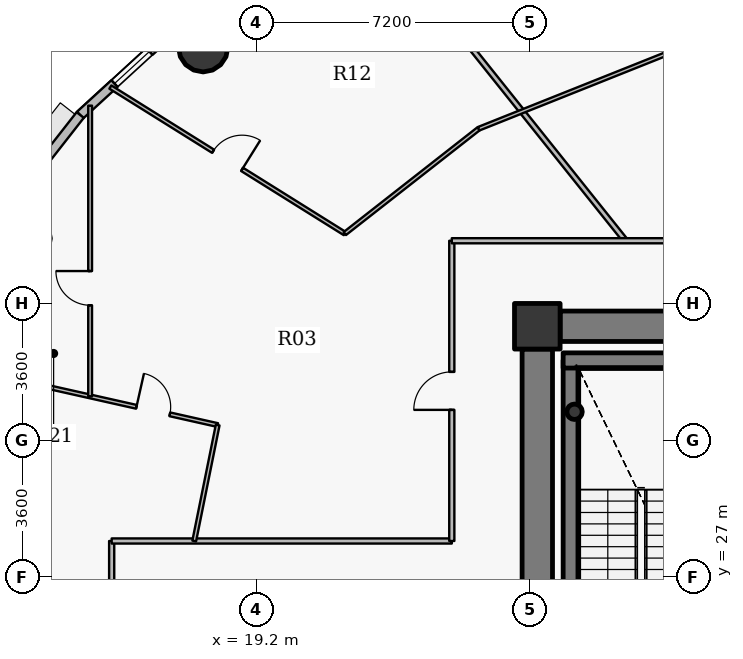
"""IFC4 building model, lengths in metres.
Left out: names, types, materials, properties, quantities, classifications, styles, units other than length and angle.
Written with IfcOpenShell. Run it as: python <this file> out.ifc"""

import sys

from ifc_helpers import new_model, si_unit, direction, frame, frame_2d, origin, origin_2d, place, context, subcontext, project, spatial, rectangle, hollow_circle, extrude, source, transform, mapped, element, fill, save


model = new_model("IFC4")
c1 = context("Model", 3, precision=1e-05, world=origin(), true_north=direction((0.0, 1.0)))
c2 = subcontext(c1, "Body", "Model", "MODEL_VIEW")
j1 = project(units=[si_unit("LENGTHUNIT", "METRE"), si_unit("PLANEANGLEUNIT", "RADIAN")], contexts=[c1])
p1 = place(None, origin())
s1 = spatial("IfcSite", under=j1, at=p1, CompositionType="ELEMENT")
p2 = place(p1, origin())
s2 = spatial("IfcBuilding", under=s1, at=p2, CompositionType="ELEMENT")
p3 = place(p2, frame((0.0, 0.0, 182.4)))
s3 = spatial("IfcBuildingStorey", under=s2, at=p3, CompositionType="ELEMENT", Elevation=182.4)
p4 = place(p3, frame((26.6, 33.6, 0.0), z_axis=(0.0, 0.0, 1.0), x_axis=(1.0, 0.0, 0.0)))
e1 = element("IfcColumn", 1, at=p4, inside=s3, PredefinedType="COLUMN", context=c2, shape_type="SweptSolid", body=[
    extrude(rectangle(XDim=1.2, YDim=1.2, at=origin_2d()), origin(), (0.0, 0.0, 1.0), 3.75),
])
p5 = place(p3, frame((27.48, 24.1, 0.0), z_axis=(0.0, 0.0, 1.0), x_axis=(0.0, 1.0, 0.0)))
e2 = element("IfcWall", 2, at=p5, inside=s3, PredefinedType="SHEAR", context=c2, shape_type="SweptSolid", body=[
    extrude(rectangle(XDim=8.6, YDim=0.4, at=frame_2d((4.3, 0.0))), origin(), (0.0, 0.0, 1.0), 3.75),
])
p6 = place(p3, frame((27.28, 32.7, 0.0), z_axis=(0.0, 0.0, 1.0), x_axis=(1.0, 0.0, 0.0)))
e3 = element("IfcWall", 3, at=p6, inside=s3, PredefinedType="SHEAR", context=c2, shape_type="SweptSolid", body=[
    extrude(rectangle(XDim=4.1, YDim=0.4, at=frame_2d((2.05, 0.0))), origin(), (0.0, 0.0, 1.0), 3.75),
])
p7 = place(p3, frame((27.58, 31.35, 0.0), z_axis=(0.0, 0.0, 1.0), x_axis=(1.0, 0.0, 0.0)))
e4 = element("IfcColumn", 4, at=p7, inside=s3, PredefinedType="COLUMN", context=c2, shape_type="SweptSolid", body=[
    extrude(hollow_circle(Radius=0.203, WallThickness=0.016, at=origin_2d()), origin(), (0.0, 0.0, 1.0), 3.75),
])
p8 = place(p3, frame((27.2, 33.6, 0.0), z_axis=(0.0, 0.0, 1.0), x_axis=(1.0, 0.0, 0.0)))
e5 = element("IfcWall", 5, at=p8, inside=s3, PredefinedType="SHEAR", context=c2, shape_type="SweptSolid", body=[
    extrude(rectangle(XDim=17.6, YDim=0.8, at=frame_2d((8.8, 0.0))), origin(), (0.0, 0.0, 1.0), 2.95),
])
p9 = place(p8, frame((13.45, 0.0, 0.0)))
e6 = element("IfcOpeningElement", 6, at=p9, cuts=e5, PredefinedType="OPENING", context=c2, shape_type="SweptSolid", body=[
    extrude(rectangle(XDim=1.15, YDim=2.15, at=origin_2d()), frame((0.575, 0.41, 1.075), z_axis=(0.0, -1.0, 0.0), x_axis=(1.0, 0.0, 0.0)), (0.0, 0.0, 1.0), 0.82),
])
p10 = place(p3, frame((26.6, 21.0, 0.0), z_axis=(0.0, 0.0, 1.0), x_axis=(0.0, 1.0, 0.0)))
e7 = element("IfcWall", 7, at=p10, inside=s3, PredefinedType="SHEAR", context=c2, shape_type="SweptSolid", body=[
    extrude(rectangle(XDim=12.0, YDim=0.8, at=frame_2d((6.0, 0.0))), origin(), (0.0, 0.0, 1.0), 2.95),
])
p11 = place(p10, frame((1.061, 0.0, 0.0)))
e8 = element("IfcOpeningElement", 8, at=p11, cuts=e7, PredefinedType="OPENING", context=c2, shape_type="SweptSolid", body=[
    extrude(rectangle(XDim=1.15, YDim=2.15, at=origin_2d()), frame((0.575, 0.41, 1.075), z_axis=(0.0, -1.0, 0.0), x_axis=(1.0, 0.0, 0.0)), (0.0, 0.0, 1.0), 0.82),
])
p12 = place(p3, frame((17.808, 40.942, 0.0), z_axis=(0.0, 0.0, 1.0), x_axis=(1.0, 0.0, 0.0)))
e9 = element("IfcColumn", 9, at=p12, inside=s3, PredefinedType="COLUMN", context=c2, shape_type="SweptSolid", body=[
    extrude(hollow_circle(Radius=0.65, WallThickness=0.04, at=origin_2d()), origin(), (0.0, 0.0, 1.0), 3.75),
])
p13 = place(p3, frame((14.572, 39.158, 0.0), z_axis=(0.0, 0.0, 1.0), x_axis=(0.737076565834, 0.675809245349, 0.0)))
e10 = element("IfcWall", 10, at=p13, inside=s3, PredefinedType="SOLIDWALL", context=c2, shape_type="SweptSolid", body=[
    extrude(rectangle(XDim=3.658, YDim=0.24, at=frame_2d((1.829, 0.0))), origin(), (0.0, 0.0, 1.0), 3.5),
])
p14 = place(p13, frame((1.224, 0.0, 0.9)))
e11 = element("IfcOpeningElement", 11, at=p14, cuts=e10, PredefinedType="OPENING", context=c2, shape_type="SweptSolid", body=[
    extrude(rectangle(XDim=1.25, YDim=1.65, at=origin_2d()), frame((0.625, 0.13, 0.825), z_axis=(0.0, -1.0, 0.0), x_axis=(1.0, 0.0, 0.0)), (0.0, 0.0, 1.0), 0.26),
])
p15 = place(p3, frame((12.404, 36.388, 0.0), z_axis=(0.0, 0.0, 1.0), x_axis=(0.616287674549, 0.787521112224, 0.0)))
e12 = element("IfcWall", 12, at=p15, inside=s3, PredefinedType="SOLIDWALL", context=c2, shape_type="SweptSolid", body=[
    extrude(rectangle(XDim=3.517, YDim=0.24, at=frame_2d((1.759, 0.0))), origin(), (0.0, 0.0, 1.0), 3.5),
])
p16 = place(p3, frame((10.602, 32.704, 0.0), z_axis=(0.0, 0.0, 1.0), x_axis=(0.9756977614, -0.21912069368, 0.0)))
e13 = element("IfcWall", 13, at=p16, inside=s3, PredefinedType="PARTITIONING", context=c2, shape_type="SweptSolid", body=[
    extrude(rectangle(XDim=7.776, YDim=0.1, at=frame_2d((3.888, 0.0))), origin(), (0.0, 0.0, 1.0), 2.935),
])
p17 = place(p16, frame((5.586, 0.0, 0.0)))
e14 = element("IfcOpeningElement", 14, at=p17, cuts=e13, PredefinedType="OPENING", context=c2, shape_type="SweptSolid", body=[
    extrude(rectangle(XDim=0.9, YDim=2.1, at=origin_2d()), frame((0.45, 0.06, 1.05), z_axis=(0.0, -1.0, 0.0), x_axis=(1.0, 0.0, 0.0)), (0.0, 0.0, 1.0), 0.12),
])
p18 = place(p3, frame((14.833, 31.754, 0.0), z_axis=(0.0, 0.0, 1.0), x_axis=(0.0, 1.0, 0.0)))
e15 = element("IfcWall", 15, at=p18, inside=s3, PredefinedType="PARTITIONING", context=c2, shape_type="SweptSolid", body=[
    extrude(rectangle(XDim=7.651, YDim=0.1, at=frame_2d((3.825, 0.0))), origin(), (0.0, 0.0, 1.0), 2.935),
])
p19 = place(p18, frame((2.399, 0.0, 0.0)))
e16 = element("IfcOpeningElement", 16, at=p19, cuts=e15, PredefinedType="OPENING", context=c2, shape_type="SweptSolid", body=[
    extrude(rectangle(XDim=0.9, YDim=2.1, at=origin_2d()), frame((0.45, 0.06, 1.05), z_axis=(0.0, -1.0, 0.0), x_axis=(1.0, 0.0, 0.0)), (0.0, 0.0, 1.0), 0.12),
])
p20 = place(p3, frame((15.366, 39.894, 0.0), z_axis=(0.0, 0.0, 1.0), x_axis=(0.84804732756, -0.529920494242, 0.0)))
e17 = element("IfcWall", 17, at=p20, inside=s3, PredefinedType="PARTITIONING", context=c2, shape_type="SweptSolid", body=[
    extrude(rectangle(XDim=7.274, YDim=0.1, at=frame_2d((3.637, 0.0))), origin(), (0.0, 0.0, 1.0), 2.935),
])
p21 = place(p20, frame((3.187, 0.0, 0.0)))
e18 = element("IfcOpeningElement", 18, at=p21, cuts=e17, PredefinedType="OPENING", context=c2, shape_type="SweptSolid", body=[
    extrude(rectangle(XDim=0.9, YDim=2.1, at=origin_2d()), frame((0.45, 0.06, 1.05), z_axis=(0.0, -1.0, 0.0), x_axis=(1.0, 0.0, 0.0)), (0.0, 0.0, 1.0), 0.12),
])
p22 = place(p3, frame((15.4, 23.146, 0.0), z_axis=(0.0, 0.0, 1.0), x_axis=(0.0, 1.0, 0.0)))
e19 = element("IfcWall", 19, at=p22, inside=s3, PredefinedType="PARTITIONING", context=c2, shape_type="SweptSolid", body=[
    extrude(rectangle(XDim=4.804, YDim=0.135, at=frame_2d((2.402, 0.0))), origin(), (0.0, 0.0, 1.0), 2.935),
])
p23 = place(p3, frame((15.4, 27.95, 0.0), z_axis=(0.0, 0.0, 1.0), x_axis=(1.0, 0.0, 0.0)))
e20 = element("IfcWall", 20, at=p23, inside=s3, PredefinedType="PARTITIONING", context=c2, shape_type="SweptSolid", body=[
    extrude(rectangle(XDim=8.95, YDim=0.135, at=frame_2d((4.475, 0.0))), origin(), (0.0, 0.0, 1.0), 3.5),
])
p24 = place(p3, frame((17.572, 27.95, 0.0), z_axis=(0.0, 0.0, 1.0), x_axis=(0.19818274337, 0.980165088253, 0.0)))
e21 = element("IfcWall", 21, at=p24, inside=s3, PredefinedType="PARTITIONING", context=c2, shape_type="SweptSolid", body=[
    extrude(rectangle(XDim=3.112, YDim=0.1, at=frame_2d((1.556, 0.0))), origin(), (0.0, 0.0, 1.0), 3.5),
])
p25 = place(p3, frame((21.534, 36.039, 0.0), z_axis=(0.0, 0.0, 1.0), x_axis=(0.787313734036, 0.616552580238, 0.0)))
e22 = element("IfcWall", 22, at=p25, inside=s3, PredefinedType="PARTITIONING", context=c2, shape_type="SweptSolid", body=[
    extrude(rectangle(XDim=4.472, YDim=0.1, at=frame_2d((2.236, 0.0))), origin(), (0.0, 0.0, 1.0), 2.935),
])
p26 = place(p3, frame((21.999, 44.503, 0.0), z_axis=(0.0, 0.0, 1.0), x_axis=(0.624673551917, -0.780886005468, 0.0)))
e23 = element("IfcWall", 23, at=p26, inside=s3, PredefinedType="PARTITIONING", context=c2, shape_type="SweptSolid", body=[
    extrude(rectangle(XDim=11.081, YDim=0.135, at=frame_2d((5.541, 0.0))), origin(), (0.0, 0.0, 1.0), 2.935),
])
p27 = place(p3, frame((24.35, 27.95, 0.0), z_axis=(0.0, 0.0, 1.0), x_axis=(0.0, 1.0, 0.0)))
e24 = element("IfcWall", 24, at=p27, inside=s3, PredefinedType="PARTITIONING", context=c2, shape_type="SweptSolid", body=[
    extrude(rectangle(XDim=7.9, YDim=0.135, at=frame_2d((3.95, 0.0))), origin(), (0.0, 0.0, 1.0), 2.935),
])
p28 = place(p27, frame((3.45, 0.0, 0.0)))
e25 = element("IfcOpeningElement", 25, at=p28, cuts=e24, PredefinedType="OPENING", context=c2, shape_type="SweptSolid", body=[
    extrude(rectangle(XDim=1.0, YDim=2.15, at=origin_2d()), frame((0.5, 0.078, 1.075), z_axis=(0.0, -1.0, 0.0), x_axis=(1.0, 0.0, 0.0)), (0.0, 0.0, 1.0), 0.155),
])
p29 = place(p3, frame((24.35, 35.85, 0.0), z_axis=(0.0, 0.0, 1.0), x_axis=(1.0, 0.0, 0.0)))
e26 = element("IfcWall", 26, at=p29, inside=s3, PredefinedType="PARTITIONING", context=c2, shape_type="SweptSolid", body=[
    extrude(rectangle(XDim=11.654, YDim=0.135, at=frame_2d((5.827, 0.0))), origin(), (0.0, 0.0, 1.0), 2.935),
])
p30 = place(p29, frame((7.592, 0.0, 0.0)))
e27 = element("IfcOpeningElement", 27, at=p30, cuts=e26, PredefinedType="OPENING", context=c2, shape_type="SweptSolid", body=[
    extrude(rectangle(XDim=1.0, YDim=2.15, at=origin_2d()), frame((0.5, 0.078, 1.075), z_axis=(0.0, -1.0, 0.0), x_axis=(1.0, 0.0, 0.0)), (0.0, 0.0, 1.0), 0.155),
])
p31 = place(p3, frame((25.055, 38.796, 0.0), z_axis=(0.0, 0.0, 1.0), x_axis=(0.928798710424, 0.370584613166, 0.0)))
e28 = element("IfcWall", 28, at=p31, inside=s3, PredefinedType="PARTITIONING", context=c2, shape_type="SweptSolid", body=[
    extrude(rectangle(XDim=5.589, YDim=0.1, at=frame_2d((2.794, 0.0))), origin(), (0.0, 0.0, 1.0), 2.935),
])
p32 = place(p3, frame((27.19, 34.0, 0.0), z_axis=(0.0, 0.0, 1.0), x_axis=(-1.0, 0.0, 0.0)))
e29 = element("IfcWall", 29, at=p32, inside=s3, PredefinedType="PARTITIONING", context=c2, shape_type="SweptSolid", body=[
    extrude(rectangle(XDim=0.99, YDim=0.135, at=frame_2d((0.495, 0.0))), origin(), (0.0, 0.0, 1.0), 2.935),
])
p33 = place(p3, frame((26.2, 33.692, 0.0), z_axis=(0.0, 0.0, 1.0), x_axis=(0.0, -1.0, 0.0)))
e30 = element("IfcWall", 30, at=p33, inside=s3, PredefinedType="PARTITIONING", context=c2, shape_type="SweptSolid", body=[
    extrude(rectangle(XDim=0.682, YDim=0.135, at=frame_2d((0.341, 0.0))), origin(), (0.0, 0.0, 1.0), 3.5),
])
m1 = source(origin(), c2, "Body", "SweptSolid", [
    extrude(rectangle(XDim=1.25, YDim=1.65, at=origin_2d()), frame((0.625, 0.03, 0.825), z_axis=(0.0, -1.0, 0.0), x_axis=(1.0, 0.0, 0.0)), (0.0, 0.0, 1.0), 0.06),
])
p34 = place(p14, origin())
e31 = element("IfcWindow", 31, at=p34, inside=s3, PartitioningType="SINGLE_PANEL", PredefinedType="WINDOW", context=c2, shape_type="MappedRepresentation", body=[
    mapped(m1, transform((0.0, 0.0, 0.0), x_axis=(1.0, 0.0, 0.0), y_axis=(0.0, 1.0, 0.0), z_axis=(0.0, 0.0, 1.0), scale=1.0)),
])
fill(e11, e31)
m2 = source(origin(), c2, "Body", "SweptSolid", [
    extrude(rectangle(XDim=1.0, YDim=2.15, at=origin_2d()), frame((0.5, 0.025, 1.075), z_axis=(0.0, -1.0, 0.0), x_axis=(1.0, 0.0, 0.0)), (0.0, 0.0, 1.0), 0.05),
])
p35 = place(p28, origin())
e32 = element("IfcDoor", 32, at=p35, inside=s3, OperationType="SINGLE_SWING_LEFT", PredefinedType="DOOR", context=c2, shape_type="MappedRepresentation", body=[
    mapped(m2, transform((0.0, 0.0, 0.0), x_axis=(1.0, 0.0, 0.0), y_axis=(0.0, 1.0, 0.0), z_axis=(0.0, 0.0, 1.0), scale=1.0)),
])
fill(e25, e32)
m3 = source(origin(), c2, "Body", "SweptSolid", [
    extrude(rectangle(XDim=0.9, YDim=2.1, at=origin_2d()), frame((0.45, 0.025, 1.05), z_axis=(0.0, -1.0, 0.0), x_axis=(1.0, 0.0, 0.0)), (0.0, 0.0, 1.0), 0.05),
])
p36 = place(p21, origin())
e33 = element("IfcDoor", 33, at=p36, inside=s3, OperationType="SINGLE_SWING_RIGHT", PredefinedType="DOOR", context=c2, shape_type="MappedRepresentation", body=[
    mapped(m3, transform((0.0, 0.0, 0.0), x_axis=(1.0, 0.0, 0.0), y_axis=(0.0, 1.0, 0.0), z_axis=(0.0, 0.0, 1.0), scale=1.0)),
])
fill(e18, e33)
p37 = place(p17, origin())
e34 = element("IfcDoor", 34, at=p37, inside=s3, OperationType="SINGLE_SWING_LEFT", PredefinedType="DOOR", context=c2, shape_type="MappedRepresentation", body=[
    mapped(m3, transform((0.0, 0.0, 0.0), x_axis=(1.0, 0.0, 0.0), y_axis=(0.0, 1.0, 0.0), z_axis=(0.0, 0.0, 1.0), scale=1.0)),
])
fill(e14, e34)
p38 = place(p19, origin())
e35 = element("IfcDoor", 35, at=p38, inside=s3, OperationType="SINGLE_SWING_RIGHT", PredefinedType="DOOR", context=c2, shape_type="MappedRepresentation", body=[
    mapped(m3, transform((0.0, 0.0, 0.0), x_axis=(1.0, 0.0, 0.0), y_axis=(0.0, 1.0, 0.0), z_axis=(0.0, 0.0, 1.0), scale=1.0)),
])
fill(e16, e35)
save(model, sys.argv[1])
